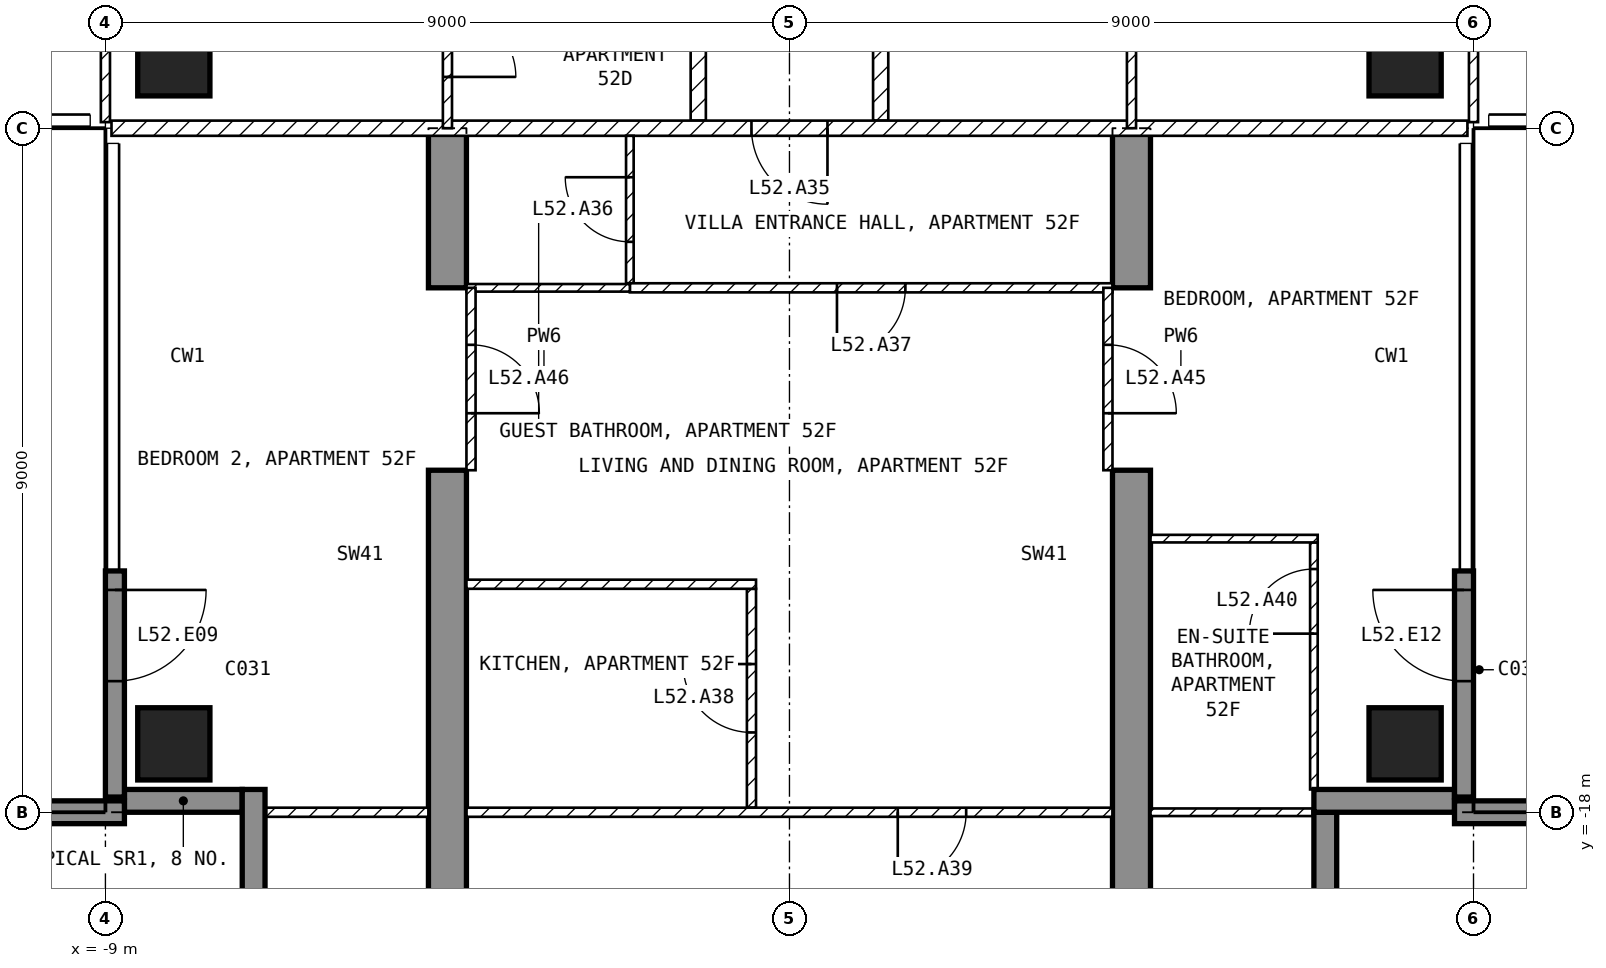
"""IFC4 building model, lengths in metres.
Left out: names, types, materials, properties, quantities, classifications, styles, units other than length and angle.
Written with IfcOpenShell. Run it as: python <this file> out.ifc"""

import sys

from ifc_helpers import new_model, si_unit, direction, frame, frame_2d, origin, origin_2d, place, context, subcontext, project, spatial, polyline, rectangle, outline, extrude, element, fill, save


model = new_model("IFC4")
c1 = context("Model", 3, precision=1e-05, world=origin(), true_north=direction((0.0, 1.0)))
c2 = subcontext(c1, "Body", "Model", "MODEL_VIEW")
j1 = project(units=[si_unit("LENGTHUNIT", "METRE"), si_unit("PLANEANGLEUNIT", "RADIAN")], contexts=[c1])
p1 = place(None, origin())
s1 = spatial("IfcSite", under=j1, at=p1, CompositionType="ELEMENT")
p2 = place(p1, origin())
s2 = spatial("IfcBuilding", under=s1, at=p2, CompositionType="ELEMENT")
p3 = place(p2, frame((0.0, 0.0, 208.6)))
s3 = spatial("IfcBuildingStorey", under=s2, at=p3, CompositionType="ELEMENT", Elevation=208.6)
for number, where, z_axis, x_axis in (
    (1, (-8.1, -17.1, -0.25), (0.0, 0.0, 1.0), (1.0, 0.0, 0.0)),
    (2, (-8.1, -8.1, -0.25), (0.0, 0.0, 1.0), (1.0, 0.0, 0.0)),
    (3, (8.1, -17.1, -0.25), (0.0, 0.0, 1.0), (1.0, 0.0, 0.0)),
    (4, (8.1, -8.1, -0.25), (0.0, 0.0, 1.0), (1.0, 0.0, 0.0)),
):
    element("IfcColumn", number, at=place(p3, frame(where, z_axis=z_axis, x_axis=x_axis)), inside=s3, PredefinedType="COLUMN", context=c2, shape_type="SweptSolid", body=[
        extrude(rectangle(XDim=0.95, YDim=0.95, at=origin_2d()), origin(), (0.0, 0.0, 1.0), 3.5),
    ])
for number, where, z_axis, x_axis in (
    (5, (-4.75, -20.225, -0.25), (1.0, 0.0, 0.0), (0.0, 1.0, 0.0)),
    (6, (4.25, -20.225, -0.25), (1.0, 0.0, 0.0), (0.0, 1.0, 0.0)),
):
    element("IfcWall", number, at=place(p3, frame(where, z_axis=z_axis, x_axis=x_axis)), inside=s3, PredefinedType="SHEAR", context=c2, shape_type="SweptSolid", body=[
        extrude(outline(polyline([(0.0, 0.0), (6.725, 0.0), (6.725, 2.65), (9.125, 2.65), (9.125, 0.0), (11.225, 0.0), (11.225, 3.5), (0.0, 3.5), (0.0, 0.0)])), origin(), (0.0, 0.0, 1.0), 0.5),
    ])
p4 = place(p3, frame((-8.875, -14.825, 0.0), z_axis=(0.0, 0.0, 1.0), x_axis=(0.0, -1.0, 0.0)))
e7 = element("IfcWall", 7, at=p4, inside=s3, PredefinedType="SOLIDWALL", context=c2, shape_type="SweptSolid", body=[
    extrude(rectangle(XDim=2.975, YDim=0.25, at=frame_2d((1.488, 0.0))), origin(), (0.0, 0.0, 1.0), 3.25),
])
p5 = place(p4, frame((0.25, 0.0, 0.0)))
e8 = element("IfcOpeningElement", 8, at=p5, cuts=e7, PredefinedType="OPENING", context=c2, shape_type="SweptSolid", body=[
    extrude(rectangle(XDim=1.2, YDim=2.4, at=frame_2d((0.6, 1.2))), frame((0.0, 0.135, 0.0), z_axis=(0.0, -1.0, 0.0), x_axis=(1.0, 0.0, 0.0)), (0.0, 0.0, 1.0), 0.27),
])
p6 = place(p3, frame((8.875, -17.8, 0.0), z_axis=(0.0, 0.0, 1.0), x_axis=(0.0, 1.0, 0.0)))
e9 = element("IfcWall", 9, at=p6, inside=s3, PredefinedType="SOLIDWALL", context=c2, shape_type="SweptSolid", body=[
    extrude(rectangle(XDim=2.975, YDim=0.25, at=frame_2d((1.488, 0.0))), origin(), (0.0, 0.0, 1.0), 3.25),
])
p7 = place(p6, frame((1.525, 0.0, 0.0)))
e10 = element("IfcOpeningElement", 10, at=p7, cuts=e9, PredefinedType="OPENING", context=c2, shape_type="SweptSolid", body=[
    extrude(rectangle(XDim=1.2, YDim=2.4, at=frame_2d((0.6, 1.2))), frame((0.0, 0.135, 0.0), z_axis=(0.0, -1.0, 0.0), x_axis=(1.0, 0.0, 0.0)), (0.0, 0.0, 1.0), 0.27),
])
p8 = place(p3, frame((7.05, -19.8, 0.0), z_axis=(0.0, 0.0, 1.0), x_axis=(0.0, 1.0, 0.0)))
e11 = element("IfcWall", 11, at=p8, inside=s3, PredefinedType="SOLIDWALL", context=c2, shape_type="SweptSolid", body=[
    extrude(rectangle(XDim=1.8, YDim=0.3, at=frame_2d((0.9, 0.0))), origin(), (0.0, 0.0, 1.0), 3.25),
])
p9 = place(p3, frame((6.9, -17.85, 0.0), z_axis=(0.0, 0.0, 1.0), x_axis=(1.0, 0.0, 0.0)))
e12 = element("IfcWall", 12, at=p9, inside=s3, PredefinedType="SOLIDWALL", context=c2, shape_type="SweptSolid", body=[
    extrude(rectangle(XDim=1.85, YDim=0.3, at=frame_2d((0.925, 0.0))), origin(), (0.0, 0.0, 1.0), 3.25),
])
p10 = place(p3, frame((-8.75, -17.85, 0.0), z_axis=(0.0, 0.0, 1.0), x_axis=(1.0, 0.0, 0.0)))
e13 = element("IfcWall", 13, at=p10, inside=s3, PredefinedType="SOLIDWALL", context=c2, shape_type="SweptSolid", body=[
    extrude(rectangle(XDim=1.55, YDim=0.3, at=frame_2d((0.775, 0.0))), origin(), (0.0, 0.0, 1.0), 3.25),
])
p11 = place(p3, frame((-7.05, -17.7, 0.0), z_axis=(0.0, 0.0, 1.0), x_axis=(0.0, -1.0, 0.0)))
e14 = element("IfcWall", 14, at=p11, inside=s3, PredefinedType="SOLIDWALL", context=c2, shape_type="SweptSolid", body=[
    extrude(rectangle(XDim=1.8, YDim=0.3, at=frame_2d((0.9, 0.0))), origin(), (0.0, 0.0, 1.0), 3.25),
])
for number, where, z_axis, x_axis in (
    (15, (-8.75, -18.0, 0.0), (0.0, 0.0, 1.0), (-1.0, 0.0, 0.0)),
    (16, (8.75, -18.0, 0.0), (0.0, 0.0, 1.0), (1.0, 0.0, 0.0)),
):
    element("IfcWall", number, at=place(p3, frame(where, z_axis=z_axis, x_axis=x_axis)), inside=s3, PredefinedType="SOLIDWALL", context=c2, shape_type="SweptSolid", body=[
        extrude(rectangle(XDim=2.95, YDim=0.3, at=frame_2d((1.475, 0.0))), origin(), (0.0, 0.0, 1.0), 3.25),
    ])
for number, where, z_axis, x_axis in (
    (17, (1.2, -4.6, 0.0), (0.0, 0.0, 1.0), (0.0, -1.0, 0.0)),
    (18, (-1.2, -8.9, 0.0), (0.0, 0.0, 1.0), (0.0, 1.0, 0.0)),
):
    element("IfcWall", number, at=place(p3, frame(where, z_axis=z_axis, x_axis=x_axis)), inside=s3, PredefinedType="PARTITIONING", context=c2, shape_type="SweptSolid", body=[
        extrude(rectangle(XDim=4.3, YDim=0.2, at=frame_2d((2.15, 0.0))), origin(), (0.0, 0.0, 1.0), 3.25),
    ])
p12 = place(p3, frame((8.92, -9.0, 0.0), z_axis=(0.0, 0.0, 1.0), x_axis=(-1.0, 0.0, 0.0)))
e19 = element("IfcWall", 19, at=p12, inside=s3, PredefinedType="PARTITIONING", context=c2, shape_type="SweptSolid", body=[
    extrude(rectangle(XDim=17.84, YDim=0.2, at=frame_2d((8.92, 0.0))), origin(), (0.0, 0.0, 1.0), 3.25),
])
p13 = place(p12, frame((8.42, 0.0, 0.0)))
e20 = element("IfcOpeningElement", 20, at=p13, cuts=e19, PredefinedType="OPENING", context=c2, shape_type="SweptSolid", body=[
    extrude(rectangle(XDim=1.0, YDim=2.1, at=frame_2d((0.5, 1.05))), frame((0.0, 0.11, 0.0), z_axis=(0.0, -1.0, 0.0), x_axis=(1.0, 0.0, 0.0)), (0.0, 0.0, 1.0), 0.22),
])
p14 = place(p3, frame((9.0, -8.92, 0.0), z_axis=(0.0, 0.0, 1.0), x_axis=(0.0, 1.0, 0.0)))
e21 = element("IfcWall", 21, at=p14, inside=s3, PredefinedType="PARTITIONING", context=c2, shape_type="SweptSolid", body=[
    extrude(rectangle(XDim=7.62, YDim=0.12, at=frame_2d((3.81, 0.0))), origin(), (0.0, 0.0, 1.0), 3.25),
])
p15 = place(p14, frame((2.42, 0.0, 0.0)))
e22 = element("IfcOpeningElement", 22, at=p15, cuts=e21, PredefinedType="OPENING", context=c2, shape_type="SweptSolid", body=[
    extrude(rectangle(XDim=0.9, YDim=2.1, at=frame_2d((0.45, 1.05))), frame((0.0, 0.07, 0.0), z_axis=(0.0, -1.0, 0.0), x_axis=(1.0, 0.0, 0.0)), (0.0, 0.0, 1.0), 0.14),
])
p16 = place(p3, frame((4.5, -9.0, 0.0), z_axis=(0.0, 0.0, 1.0), x_axis=(0.0, 1.0, 0.0)))
e23 = element("IfcWall", 23, at=p16, inside=s3, PredefinedType="PARTITIONING", context=c2, shape_type="SweptSolid", body=[
    extrude(rectangle(XDim=4.4, YDim=0.12, at=frame_2d((2.2, 0.0))), origin(), (0.0, 0.0, 1.0), 3.25),
])
p17 = place(p16, frame((1.75, 0.0, 0.0)))
e24 = element("IfcOpeningElement", 24, at=p17, cuts=e23, PredefinedType="OPENING", context=c2, shape_type="SweptSolid", body=[
    extrude(rectangle(XDim=0.9, YDim=2.1, at=frame_2d((0.45, 1.05))), frame((0.0, 0.07, 0.0), z_axis=(0.0, -1.0, 0.0), x_axis=(1.0, 0.0, 0.0)), (0.0, 0.0, 1.0), 0.14),
])
p18 = place(p3, frame((-9.0, -1.3, 0.0), z_axis=(0.0, 0.0, 1.0), x_axis=(0.0, -1.0, 0.0)))
e25 = element("IfcWall", 25, at=p18, inside=s3, PredefinedType="PARTITIONING", context=c2, shape_type="SweptSolid", body=[
    extrude(rectangle(XDim=7.62, YDim=0.12, at=frame_2d((3.81, 0.0))), origin(), (0.0, 0.0, 1.0), 3.25),
])
p19 = place(p18, frame((4.3, 0.0, 0.0)))
e26 = element("IfcOpeningElement", 26, at=p19, cuts=e25, PredefinedType="OPENING", context=c2, shape_type="SweptSolid", body=[
    extrude(rectangle(XDim=0.9, YDim=2.1, at=frame_2d((0.45, 1.05))), frame((0.0, 0.07, 0.0), z_axis=(0.0, -1.0, 0.0), x_axis=(1.0, 0.0, 0.0)), (0.0, 0.0, 1.0), 0.14),
])
p20 = place(p3, frame((-4.5, -6.75, 0.0), z_axis=(0.0, 0.0, 1.0), x_axis=(0.0, -1.0, 0.0)))
e27 = element("IfcWall", 27, at=p20, inside=s3, PredefinedType="PARTITIONING", context=c2, shape_type="SweptSolid", body=[
    extrude(rectangle(XDim=2.25, YDim=0.12, at=frame_2d((1.125, 0.0))), origin(), (0.0, 0.0, 1.0), 3.25),
])
p21 = place(p20, frame((0.675, 0.0, 0.0)))
e28 = element("IfcOpeningElement", 28, at=p21, cuts=e27, PredefinedType="OPENING", context=c2, shape_type="SweptSolid", body=[
    extrude(rectangle(XDim=0.9, YDim=2.1, at=frame_2d((0.45, 1.05))), frame((0.0, 0.07, 0.0), z_axis=(0.0, -1.0, 0.0), x_axis=(1.0, 0.0, 0.0)), (0.0, 0.0, 1.0), 0.14),
])
p22 = place(p3, frame((-2.1, -11.04, 0.0), z_axis=(0.0, 0.0, 1.0), x_axis=(0.0, 1.0, 0.0)))
e29 = element("IfcWall", 29, at=p22, inside=s3, PredefinedType="PARTITIONING", context=c2, shape_type="SweptSolid", body=[
    extrude(rectangle(XDim=1.94, YDim=0.1, at=frame_2d((0.97, 0.0))), origin(), (0.0, 0.0, 1.0), 3.25),
])
p23 = place(p22, frame((0.545, 0.0, 0.0)))
e30 = element("IfcOpeningElement", 30, at=p23, cuts=e29, PredefinedType="OPENING", context=c2, shape_type="SweptSolid", body=[
    extrude(rectangle(XDim=0.85, YDim=2.1, at=frame_2d((0.425, 1.05))), frame((0.0, 0.06, 0.0), z_axis=(0.0, -1.0, 0.0), x_axis=(1.0, 0.0, 0.0)), (0.0, 0.0, 1.0), 0.12),
])
p24 = place(p3, frame((4.25, -11.1, 0.0), z_axis=(0.0, 0.0, 1.0), x_axis=(-1.0, 0.0, 0.0)))
e31 = element("IfcWall", 31, at=p24, inside=s3, PredefinedType="PARTITIONING", context=c2, shape_type="SweptSolid", body=[
    extrude(rectangle(XDim=6.35, YDim=0.12, at=frame_2d((3.175, 0.0))), origin(), (0.0, 0.0, 1.0), 3.25),
])
p25 = place(p24, frame((2.725, 0.0, 0.0)))
e32 = element("IfcOpeningElement", 32, at=p25, cuts=e31, PredefinedType="OPENING", context=c2, shape_type="SweptSolid", body=[
    extrude(rectangle(XDim=0.9, YDim=2.1, at=frame_2d((0.45, 1.05))), frame((0.0, 0.07, 0.0), z_axis=(0.0, -1.0, 0.0), x_axis=(1.0, 0.0, 0.0)), (0.0, 0.0, 1.0), 0.14),
])
p26 = place(p3, frame((-2.1, -11.1, 0.0), z_axis=(0.0, 0.0, 1.0), x_axis=(-1.0, 0.0, 0.0)))
e33 = element("IfcWall", 33, at=p26, inside=s3, PredefinedType="PARTITIONING", context=c2, shape_type="SweptSolid", body=[
    extrude(rectangle(XDim=2.15, YDim=0.1, at=frame_2d((1.075, 0.0))), origin(), (0.0, 0.0, 1.0), 3.25),
])
p27 = place(p3, frame((-0.5, -17.94, 0.0), z_axis=(0.0, 0.0, 1.0), x_axis=(0.0, 1.0, 0.0)))
e34 = element("IfcWall", 34, at=p27, inside=s3, PredefinedType="PARTITIONING", context=c2, shape_type="SweptSolid", body=[
    extrude(rectangle(XDim=2.88, YDim=0.12, at=frame_2d((1.44, 0.0))), origin(), (0.0, 0.0, 1.0), 3.25),
])
p28 = place(p27, frame((0.99, 0.0, 0.0)))
e35 = element("IfcOpeningElement", 35, at=p28, cuts=e34, PredefinedType="OPENING", context=c2, shape_type="SweptSolid", body=[
    extrude(rectangle(XDim=0.9, YDim=2.1, at=frame_2d((0.45, 1.05))), frame((0.0, 0.07, 0.0), z_axis=(0.0, -1.0, 0.0), x_axis=(1.0, 0.0, 0.0)), (0.0, 0.0, 1.0), 0.14),
])
p29 = place(p3, frame((-0.44, -15.0, 0.0), z_axis=(0.0, 0.0, 1.0), x_axis=(-1.0, 0.0, 0.0)))
e36 = element("IfcWall", 36, at=p29, inside=s3, PredefinedType="PARTITIONING", context=c2, shape_type="SweptSolid", body=[
    extrude(rectangle(XDim=3.81, YDim=0.12, at=frame_2d((1.905, 0.0))), origin(), (0.0, 0.0, 1.0), 3.25),
])
p30 = place(p3, frame((4.25, -18.0, 0.0), z_axis=(0.0, 0.0, 1.0), x_axis=(-1.0, 0.0, 0.0)))
e37 = element("IfcWall", 37, at=p30, inside=s3, PredefinedType="PARTITIONING", context=c2, shape_type="SweptSolid", body=[
    extrude(rectangle(XDim=8.5, YDim=0.12, at=frame_2d((4.25, 0.0))), origin(), (0.0, 0.0, 1.0), 3.25),
])
p31 = place(p30, frame((1.925, 0.0, 0.0)))
e38 = element("IfcOpeningElement", 38, at=p31, cuts=e37, PredefinedType="OPENING", context=c2, shape_type="SweptSolid", body=[
    extrude(rectangle(XDim=0.9, YDim=2.1, at=frame_2d((0.45, 1.05))), frame((0.0, 0.07, 0.0), z_axis=(0.0, -1.0, 0.0), x_axis=(1.0, 0.0, 0.0)), (0.0, 0.0, 1.0), 0.14),
])
p32 = place(p3, frame((6.9, -17.7, 0.0), z_axis=(0.0, 0.0, 1.0), x_axis=(0.0, 1.0, 0.0)))
e39 = element("IfcWall", 39, at=p32, inside=s3, PredefinedType="PARTITIONING", context=c2, shape_type="SweptSolid", body=[
    extrude(rectangle(XDim=3.25, YDim=0.1, at=frame_2d((1.625, 0.0))), origin(), (0.0, 0.0, 1.0), 3.25),
])
p33 = place(p32, frame((2.05, 0.0, 0.0)))
e40 = element("IfcOpeningElement", 40, at=p33, cuts=e39, PredefinedType="OPENING", context=c2, shape_type="SweptSolid", body=[
    extrude(rectangle(XDim=0.85, YDim=2.1, at=frame_2d((0.425, 1.05))), frame((0.0, 0.06, 0.0), z_axis=(0.0, -1.0, 0.0), x_axis=(1.0, 0.0, 0.0)), (0.0, 0.0, 1.0), 0.12),
])
p34 = place(p3, frame((6.95, -14.4, 0.0), z_axis=(0.0, 0.0, 1.0), x_axis=(-1.0, 0.0, 0.0)))
e41 = element("IfcWall", 41, at=p34, inside=s3, PredefinedType="PARTITIONING", context=c2, shape_type="SweptSolid", body=[
    extrude(rectangle(XDim=2.2, YDim=0.1, at=frame_2d((1.1, 0.0))), origin(), (0.0, 0.0, 1.0), 3.25),
])
p35 = place(p3, frame((7.12, -18.0, 0.0), z_axis=(0.0, 0.0, 1.0), x_axis=(-1.0, 0.0, 0.0)))
e42 = element("IfcWall", 42, at=p35, inside=s3, PredefinedType="PARTITIONING", context=c2, shape_type="SweptSolid", body=[
    extrude(rectangle(XDim=2.37, YDim=0.1, at=frame_2d((1.185, 0.0))), origin(), (0.0, 0.0, 1.0), 3.25),
])
p36 = place(p3, frame((-4.75, -18.0, 0.0), z_axis=(0.0, 0.0, 1.0), x_axis=(-1.0, 0.0, 0.0)))
e43 = element("IfcWall", 43, at=p36, inside=s3, PredefinedType="PARTITIONING", context=c2, shape_type="SweptSolid", body=[
    extrude(rectangle(XDim=2.37, YDim=0.12, at=frame_2d((1.185, 0.0))), origin(), (0.0, 0.0, 1.0), 3.25),
])
p37 = place(p3, frame((4.19, -11.1, 0.0), z_axis=(0.0, 0.0, 1.0), x_axis=(0.0, -1.0, 0.0)))
e44 = element("IfcWall", 44, at=p37, inside=s3, PredefinedType="PARTITIONING", context=c2, shape_type="SweptSolid", body=[
    extrude(rectangle(XDim=2.4, YDim=0.12, at=frame_2d((1.2, 0.0))), origin(), (0.0, 0.0, 1.0), 2.4),
])
p38 = place(p37, frame((0.75, 0.0, 0.0)))
e45 = element("IfcOpeningElement", 45, at=p38, cuts=e44, PredefinedType="OPENING", context=c2, shape_type="SweptSolid", body=[
    extrude(rectangle(XDim=0.9, YDim=2.1, at=frame_2d((0.45, 1.05))), frame((0.0, 0.07, 0.0), z_axis=(0.0, -1.0, 0.0), x_axis=(1.0, 0.0, 0.0)), (0.0, 0.0, 1.0), 0.14),
])
p39 = place(p3, frame((-4.19, -11.1, 0.0), z_axis=(0.0, 0.0, 1.0), x_axis=(0.0, -1.0, 0.0)))
e46 = element("IfcWall", 46, at=p39, inside=s3, PredefinedType="PARTITIONING", context=c2, shape_type="SweptSolid", body=[
    extrude(rectangle(XDim=2.4, YDim=0.12, at=frame_2d((1.2, 0.0))), origin(), (0.0, 0.0, 1.0), 2.4),
])
p40 = place(p39, frame((0.75, 0.0, 0.0)))
e47 = element("IfcOpeningElement", 47, at=p40, cuts=e46, PredefinedType="OPENING", context=c2, shape_type="SweptSolid", body=[
    extrude(rectangle(XDim=0.9, YDim=2.1, at=frame_2d((0.45, 1.05))), frame((0.0, 0.07, 0.0), z_axis=(0.0, -1.0, 0.0), x_axis=(1.0, 0.0, 0.0)), (0.0, 0.0, 1.0), 0.14),
])
p41 = place(p5, origin())
e48 = element("IfcDoor", 48, at=p41, inside=s3, OperationType="SINGLE_SWING_LEFT", PredefinedType="DOOR", context=c2, shape_type="SweptSolid", body=[
    extrude(rectangle(XDim=1.2, YDim=2.4, at=frame_2d((0.6, 1.2))), frame((0.0, 0.025, 0.0), z_axis=(0.0, -1.0, 0.0), x_axis=(1.0, 0.0, 0.0)), (0.0, 0.0, 1.0), 0.05),
])
fill(e8, e48)
p42 = place(p7, origin())
e49 = element("IfcDoor", 49, at=p42, inside=s3, OperationType="SINGLE_SWING_RIGHT", PredefinedType="DOOR", context=c2, shape_type="SweptSolid", body=[
    extrude(rectangle(XDim=1.2, YDim=2.4, at=frame_2d((0.6, 1.2))), frame((0.0, 0.025, 0.0), z_axis=(0.0, -1.0, 0.0), x_axis=(1.0, 0.0, 0.0)), (0.0, 0.0, 1.0), 0.05),
])
fill(e10, e49)
p43 = place(p21, origin())
e50 = element("IfcDoor", 50, at=p43, inside=s3, OperationType="SINGLE_SWING_RIGHT", PredefinedType="DOOR", context=c2, shape_type="SweptSolid", body=[
    extrude(rectangle(XDim=0.9, YDim=2.1, at=frame_2d((0.45, 1.05))), frame((0.0, 0.025, 0.0), z_axis=(0.0, -1.0, 0.0), x_axis=(1.0, 0.0, 0.0)), (0.0, 0.0, 1.0), 0.05),
])
fill(e28, e50)
p44 = place(p13, origin())
e51 = element("IfcDoor", 51, at=p44, inside=s3, OperationType="SINGLE_SWING_LEFT", PredefinedType="DOOR", context=c2, shape_type="SweptSolid", body=[
    extrude(rectangle(XDim=1.0, YDim=2.1, at=frame_2d((0.5, 1.05))), frame((0.0, 0.025, 0.0), z_axis=(0.0, -1.0, 0.0), x_axis=(1.0, 0.0, 0.0)), (0.0, 0.0, 1.0), 0.05),
])
fill(e20, e51)
p45 = place(p23, origin())
e52 = element("IfcDoor", 52, at=p45, inside=s3, OperationType="SINGLE_SWING_RIGHT", PredefinedType="DOOR", context=c2, shape_type="SweptSolid", body=[
    extrude(rectangle(XDim=0.85, YDim=2.1, at=frame_2d((0.425, 1.05))), frame((0.0, 0.025, 0.0), z_axis=(0.0, -1.0, 0.0), x_axis=(1.0, 0.0, 0.0)), (0.0, 0.0, 1.0), 0.05),
])
fill(e30, e52)
p46 = place(p25, origin())
e53 = element("IfcDoor", 53, at=p46, inside=s3, OperationType="SINGLE_SWING_RIGHT", PredefinedType="DOOR", context=c2, shape_type="SweptSolid", body=[
    extrude(rectangle(XDim=0.9, YDim=2.1, at=frame_2d((0.45, 1.05))), frame((0.0, 0.025, 0.0), z_axis=(0.0, -1.0, 0.0), x_axis=(1.0, 0.0, 0.0)), (0.0, 0.0, 1.0), 0.05),
])
fill(e32, e53)
p47 = place(p28, origin())
e54 = element("IfcDoor", 54, at=p47, inside=s3, OperationType="SINGLE_SWING_RIGHT", PredefinedType="DOOR", context=c2, shape_type="SweptSolid", body=[
    extrude(rectangle(XDim=0.9, YDim=2.1, at=frame_2d((0.45, 1.05))), frame((0.0, 0.025, 0.0), z_axis=(0.0, -1.0, 0.0), x_axis=(1.0, 0.0, 0.0)), (0.0, 0.0, 1.0), 0.05),
])
fill(e35, e54)
p48 = place(p31, origin())
e55 = element("IfcDoor", 55, at=p48, inside=s3, OperationType="SINGLE_SWING_RIGHT", PredefinedType="DOOR", context=c2, shape_type="SweptSolid", body=[
    extrude(rectangle(XDim=0.9, YDim=2.1, at=frame_2d((0.45, 1.05))), frame((0.0, 0.025, 0.0), z_axis=(0.0, -1.0, 0.0), x_axis=(1.0, 0.0, 0.0)), (0.0, 0.0, 1.0), 0.05),
])
fill(e38, e55)
p49 = place(p33, origin())
e56 = element("IfcDoor", 56, at=p49, inside=s3, OperationType="SINGLE_SWING_LEFT", PredefinedType="DOOR", context=c2, shape_type="SweptSolid", body=[
    extrude(rectangle(XDim=0.85, YDim=2.1, at=frame_2d((0.425, 1.05))), frame((0.0, 0.025, 0.0), z_axis=(0.0, -1.0, 0.0), x_axis=(1.0, 0.0, 0.0)), (0.0, 0.0, 1.0), 0.05),
])
fill(e40, e56)
p50 = place(p38, origin())
e57 = element("IfcDoor", 57, at=p50, inside=s3, OperationType="SINGLE_SWING_RIGHT", PredefinedType="DOOR", context=c2, shape_type="SweptSolid", body=[
    extrude(rectangle(XDim=0.9, YDim=2.1, at=frame_2d((0.45, 1.05))), frame((0.0, 0.025, 0.0), z_axis=(0.0, -1.0, 0.0), x_axis=(1.0, 0.0, 0.0)), (0.0, 0.0, 1.0), 0.05),
])
fill(e45, e57)
p51 = place(p40, origin())
e58 = element("IfcDoor", 58, at=p51, inside=s3, OperationType="SINGLE_SWING_RIGHT", PredefinedType="DOOR", context=c2, shape_type="SweptSolid", body=[
    extrude(rectangle(XDim=0.9, YDim=2.1, at=frame_2d((0.45, 1.05))), frame((0.0, 0.025, 0.0), z_axis=(0.0, -1.0, 0.0), x_axis=(1.0, 0.0, 0.0)), (0.0, 0.0, 1.0), 0.05),
])
fill(e47, e58)
save(model, sys.argv[1])
